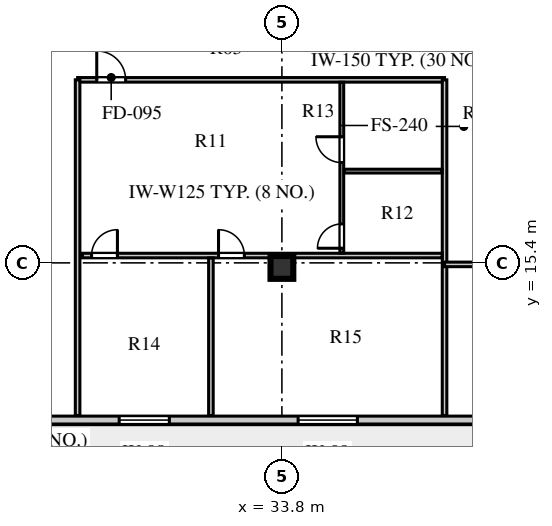
"""IFC4 building model, lengths in metres.
Left out: names, types, materials, properties, quantities, classifications, styles, units other than length and angle.
Written with IfcOpenShell. Run it as: python <this file> out.ifc"""

import sys

from ifc_helpers import new_model, si_unit, direction, frame, frame_2d, origin, origin_2d, place, context, subcontext, project, spatial, rectangle, extrude, element, fill, save


model = new_model("IFC4")
c1 = context("Model", 3, precision=1e-05, world=origin(), true_north=direction((0.0, 1.0)))
c2 = subcontext(c1, "Body", "Model", "MODEL_VIEW")
j1 = project(units=[si_unit("LENGTHUNIT", "METRE"), si_unit("PLANEANGLEUNIT", "RADIAN")], contexts=[c1])
p1 = place(None, origin())
s1 = spatial("IfcSite", under=j1, at=p1, CompositionType="ELEMENT")
p2 = place(p1, origin())
s2 = spatial("IfcBuilding", under=s1, at=p2, CompositionType="ELEMENT")
p3 = place(p2, frame((0.0, 0.0, 312.5)))
s3 = spatial("IfcBuildingStorey", under=s2, at=p3, CompositionType="ELEMENT", Elevation=312.5)
p4 = place(p3, frame((33.8, 15.25, 0.0), z_axis=(0.0, 0.0, 1.0), x_axis=(1.0, 0.0, 0.0)))
e1 = element("IfcColumn", 1, at=p4, inside=s3, PredefinedType="COLUMN", context=c2, shape_type="SweptSolid", body=[
    extrude(rectangle(XDim=0.75, YDim=0.75, at=origin_2d()), origin(), (0.0, 0.0, 1.0), 3.56),
])
p5 = place(p3, frame((13.45, 10.23, 0.0), z_axis=(0.0, 0.0, 1.0), x_axis=(1.0, 0.0, 0.0)))
e2 = element("IfcWall", 2, at=p5, inside=s3, PredefinedType="SOLIDWALL", context=c2, shape_type="SweptSolid", body=[
    extrude(rectangle(XDim=31.7, YDim=0.26, at=frame_2d((15.85, 0.0))), origin(), (0.0, 0.0, 1.0), 3.56),
])
p6 = place(p5, frame((0.95, 0.0, 0.0)))
e3 = element("IfcOpeningElement", 3, at=p6, cuts=e2, PredefinedType="OPENING", context=c2, shape_type="SweptSolid", body=[
    extrude(rectangle(XDim=1.0, YDim=2.05, at=frame_2d((0.5, 1.025))), frame((0.0, 0.14, 0.0), z_axis=(0.0, -1.0, 0.0), x_axis=(1.0, 0.0, 0.0)), (0.0, 0.0, 1.0), 0.28),
])
p7 = place(p5, frame((6.16, 0.0, 0.8)))
e4 = element("IfcOpeningElement", 4, at=p7, cuts=e2, PredefinedType="OPENING", context=c2, shape_type="SweptSolid", body=[
    extrude(rectangle(XDim=1.35, YDim=1.9, at=frame_2d((0.675, 0.95))), frame((0.0, 0.14, 0.0), z_axis=(0.0, -1.0, 0.0), x_axis=(1.0, 0.0, 0.0)), (0.0, 0.0, 1.0), 0.28),
])
p8 = place(p5, frame((14.998, 0.0, 0.8)))
e5 = element("IfcOpeningElement", 5, at=p8, cuts=e2, PredefinedType="OPENING", context=c2, shape_type="SweptSolid", body=[
    extrude(rectangle(XDim=1.65, YDim=1.95, at=frame_2d((0.825, 0.975))), frame((0.0, 0.14, 0.0), z_axis=(0.0, -1.0, 0.0), x_axis=(1.0, 0.0, 0.0)), (0.0, 0.0, 1.0), 0.28),
])
p9 = place(p5, frame((20.883, 0.0, 0.8)))
e6 = element("IfcOpeningElement", 6, at=p9, cuts=e2, PredefinedType="OPENING", context=c2, shape_type="SweptSolid", body=[
    extrude(rectangle(XDim=1.95, YDim=2.0, at=frame_2d((0.975, 1.0))), frame((0.0, 0.14, 0.0), z_axis=(0.0, -1.0, 0.0), x_axis=(1.0, 0.0, 0.0)), (0.0, 0.0, 1.0), 0.28),
])
p10 = place(p5, frame((27.52, 0.0, 0.8)))
e7 = element("IfcOpeningElement", 7, at=p10, cuts=e2, PredefinedType="OPENING", context=c2, shape_type="SweptSolid", body=[
    extrude(rectangle(XDim=2.25, YDim=2.0, at=frame_2d((1.125, 1.0))), frame((0.0, 0.14, 0.0), z_axis=(0.0, -1.0, 0.0), x_axis=(1.0, 0.0, 0.0)), (0.0, 0.0, 1.0), 0.28),
])
p11 = place(p3, frame((27.08, 21.42, 0.0), z_axis=(0.0, 0.0, 1.0), x_axis=(1.0, 0.0, 0.0)))
e8 = element("IfcWall", 8, at=p11, inside=s3, PredefinedType="PARTITIONING", context=c2, shape_type="SweptSolid", body=[
    extrude(rectangle(XDim=12.07, YDim=0.15, at=frame_2d((6.035, 0.0))), origin(), (0.0, 0.0, 1.0), 3.26),
])
p12 = place(p11, frame((0.63, 0.0, 0.0)))
e9 = element("IfcOpeningElement", 9, at=p12, cuts=e8, PredefinedType="OPENING", context=c2, shape_type="SweptSolid", body=[
    extrude(rectangle(XDim=0.95, YDim=2.1, at=frame_2d((0.475, 1.05))), frame((0.0, 0.085, 0.0), z_axis=(0.0, -1.0, 0.0), x_axis=(1.0, 0.0, 0.0)), (0.0, 0.0, 1.0), 0.17),
])
for number, where, z_axis, x_axis in (
    (10, (27.08, 10.38, 0.0), (0.0, 0.0, 1.0), (0.0, 1.0, 0.0)),
    (11, (39.15, 10.38, 0.0), (0.0, 0.0, 1.0), (0.0, 1.0, 0.0)),
):
    element("IfcWall", number, at=place(p3, frame(where, z_axis=z_axis, x_axis=x_axis)), inside=s3, PredefinedType="PARTITIONING", context=c2, shape_type="SweptSolid", body=[
        extrude(rectangle(XDim=11.04, YDim=0.15, at=frame_2d((5.52, 0.0))), origin(), (0.0, 0.0, 1.0), 3.56),
    ])
p13 = place(p3, frame((27.24, 15.641, 0.0), z_axis=(0.0, 0.0, 1.0), x_axis=(1.0, 0.0, 0.0)))
e12 = element("IfcWall", 12, at=p13, inside=s3, PredefinedType="PARTITIONING", context=c2, shape_type="SweptSolid", body=[
    extrude(rectangle(XDim=11.83, YDim=0.15, at=frame_2d((5.915, 0.0))), origin(), (0.0, 0.0, 1.0), 3.56),
])
p14 = place(p13, frame((0.3, 0.0, 0.0)))
e13 = element("IfcOpeningElement", 13, at=p14, cuts=e12, PredefinedType="OPENING", context=c2, shape_type="SweptSolid", body=[
    extrude(rectangle(XDim=0.85, YDim=2.08, at=frame_2d((0.425, 1.04))), frame((0.0, 0.085, 0.0), z_axis=(0.0, -1.0, 0.0), x_axis=(1.0, 0.0, 0.0)), (0.0, 0.0, 1.0), 0.17),
])
p15 = place(p13, frame((4.475, 0.0, 0.0)))
e14 = element("IfcOpeningElement", 14, at=p15, cuts=e12, PredefinedType="OPENING", context=c2, shape_type="SweptSolid", body=[
    extrude(rectangle(XDim=0.85, YDim=2.08, at=frame_2d((0.425, 1.04))), frame((0.0, 0.085, 0.0), z_axis=(0.0, -1.0, 0.0), x_axis=(1.0, 0.0, 0.0)), (0.0, 0.0, 1.0), 0.17),
])
p16 = place(p3, frame((35.77, 15.721, 0.0), z_axis=(0.0, 0.0, 1.0), x_axis=(0.0, 1.0, 0.0)))
e15 = element("IfcWall", 15, at=p16, inside=s3, PredefinedType="PLUMBINGWALL", context=c2, shape_type="SweptSolid", body=[
    extrude(rectangle(XDim=5.619, YDim=0.125, at=frame_2d((2.81, 0.0))), origin(), (0.0, 0.0, 1.0), 3.56),
])
p17 = place(p16, frame((0.16, 0.0, 0.0)))
e16 = element("IfcOpeningElement", 16, at=p17, cuts=e15, PredefinedType="OPENING", context=c2, shape_type="SweptSolid", body=[
    extrude(rectangle(XDim=0.8, YDim=2.05, at=frame_2d((0.4, 1.025))), frame((0.0, 0.073, 0.0), z_axis=(0.0, -1.0, 0.0), x_axis=(1.0, 0.0, 0.0)), (0.0, 0.0, 1.0), 0.145),
])
p18 = place(p16, frame((2.977, 0.0, 0.0)))
e17 = element("IfcOpeningElement", 17, at=p18, cuts=e15, PredefinedType="OPENING", context=c2, shape_type="SweptSolid", body=[
    extrude(rectangle(XDim=0.85, YDim=2.08, at=frame_2d((0.425, 1.04))), frame((0.0, 0.073, 0.0), z_axis=(0.0, -1.0, 0.0), x_axis=(1.0, 0.0, 0.0)), (0.0, 0.0, 1.0), 0.145),
])
p19 = place(p3, frame((35.85, 18.418, 0.0), z_axis=(0.0, 0.0, 1.0), x_axis=(1.0, 0.0, 0.0)))
e18 = element("IfcWall", 18, at=p19, inside=s3, PredefinedType="PLUMBINGWALL", context=c2, shape_type="SweptSolid", body=[
    extrude(rectangle(XDim=3.22, YDim=0.125, at=frame_2d((1.61, 0.0))), origin(), (0.0, 0.0, 1.0), 3.26),
])
p20 = place(p3, frame((31.465, 10.38, 0.0), z_axis=(0.0, 0.0, 1.0), x_axis=(0.0, 1.0, 0.0)))
e19 = element("IfcWall", 19, at=p20, inside=s3, PredefinedType="PARTITIONING", context=c2, shape_type="SweptSolid", body=[
    extrude(rectangle(XDim=5.181, YDim=0.15, at=frame_2d((2.591, 0.0))), origin(), (0.0, 0.0, 1.0), 3.56),
])
p21 = place(p3, frame((39.15, 15.35, 0.0), z_axis=(0.0, 0.0, 1.0), x_axis=(1.0, 0.0, 0.0)))
e20 = element("IfcWall", 20, at=p21, inside=s3, PredefinedType="PARTITIONING", context=c2, shape_type="SweptSolid", body=[
    extrude(rectangle(XDim=8.77, YDim=0.15, at=frame_2d((4.385, 0.0))), origin(), (0.0, 0.0, 1.0), 2.96),
])
p22 = place(p8, origin())
e21 = element("IfcWindow", 21, at=p22, inside=s3, PartitioningType="SINGLE_PANEL", PredefinedType="WINDOW", context=c2, shape_type="SweptSolid", body=[
    extrude(rectangle(XDim=1.65, YDim=1.95, at=frame_2d((0.825, 0.975))), frame((0.0, 0.03, 0.0), z_axis=(0.0, -1.0, 0.0), x_axis=(1.0, 0.0, 0.0)), (0.0, 0.0, 1.0), 0.06),
])
fill(e5, e21)
p23 = place(p9, origin())
e22 = element("IfcWindow", 22, at=p23, inside=s3, PartitioningType="SINGLE_PANEL", PredefinedType="WINDOW", context=c2, shape_type="SweptSolid", body=[
    extrude(rectangle(XDim=1.95, YDim=2.0, at=frame_2d((0.975, 1.0))), frame((0.0, 0.03, 0.0), z_axis=(0.0, -1.0, 0.0), x_axis=(1.0, 0.0, 0.0)), (0.0, 0.0, 1.0), 0.06),
])
fill(e6, e22)
p24 = place(p17, origin())
e23 = element("IfcDoor", 23, at=p24, inside=s3, OperationType="SINGLE_SWING_LEFT", PredefinedType="DOOR", context=c2, shape_type="SweptSolid", body=[
    extrude(rectangle(XDim=0.8, YDim=2.05, at=frame_2d((0.4, 1.025))), frame((0.0, 0.025, 0.0), z_axis=(0.0, -1.0, 0.0), x_axis=(1.0, 0.0, 0.0)), (0.0, 0.0, 1.0), 0.05),
])
fill(e16, e23)
p25 = place(p18, origin())
e24 = element("IfcDoor", 24, at=p25, inside=s3, OperationType="SINGLE_SWING_RIGHT", PredefinedType="DOOR", context=c2, shape_type="SweptSolid", body=[
    extrude(rectangle(XDim=0.85, YDim=2.08, at=frame_2d((0.425, 1.04))), frame((0.0, 0.025, 0.0), z_axis=(0.0, -1.0, 0.0), x_axis=(1.0, 0.0, 0.0)), (0.0, 0.0, 1.0), 0.05),
])
fill(e17, e24)
p26 = place(p14, frame((0.85, 0.0, 0.0), z_axis=(0.0, 0.0, 1.0), x_axis=(-1.0, 0.0, 0.0)))
e25 = element("IfcDoor", 25, at=p26, inside=s3, OperationType="SINGLE_SWING_LEFT", PredefinedType="DOOR", context=c2, shape_type="SweptSolid", body=[
    extrude(rectangle(XDim=0.85, YDim=2.08, at=frame_2d((0.425, 1.04))), frame((0.0, 0.025, 0.0), z_axis=(0.0, -1.0, 0.0), x_axis=(1.0, 0.0, 0.0)), (0.0, 0.0, 1.0), 0.05),
])
fill(e13, e25)
p27 = place(p15, frame((0.85, 0.0, 0.0), z_axis=(0.0, 0.0, 1.0), x_axis=(-1.0, 0.0, 0.0)))
e26 = element("IfcDoor", 26, at=p27, inside=s3, OperationType="SINGLE_SWING_RIGHT", PredefinedType="DOOR", context=c2, shape_type="SweptSolid", body=[
    extrude(rectangle(XDim=0.85, YDim=2.08, at=frame_2d((0.425, 1.04))), frame((0.0, 0.025, 0.0), z_axis=(0.0, -1.0, 0.0), x_axis=(1.0, 0.0, 0.0)), (0.0, 0.0, 1.0), 0.05),
])
fill(e14, e26)
p28 = place(p12, frame((0.95, 0.0, 0.0), z_axis=(0.0, 0.0, 1.0), x_axis=(-1.0, 0.0, 0.0)))
e27 = element("IfcDoor", 27, at=p28, inside=s3, OperationType="SINGLE_SWING_RIGHT", PredefinedType="DOOR", context=c2, shape_type="SweptSolid", body=[
    extrude(rectangle(XDim=0.95, YDim=2.1, at=frame_2d((0.475, 1.05))), frame((0.0, 0.025, 0.0), z_axis=(0.0, -1.0, 0.0), x_axis=(1.0, 0.0, 0.0)), (0.0, 0.0, 1.0), 0.05),
])
fill(e9, e27)
save(model, sys.argv[1])
